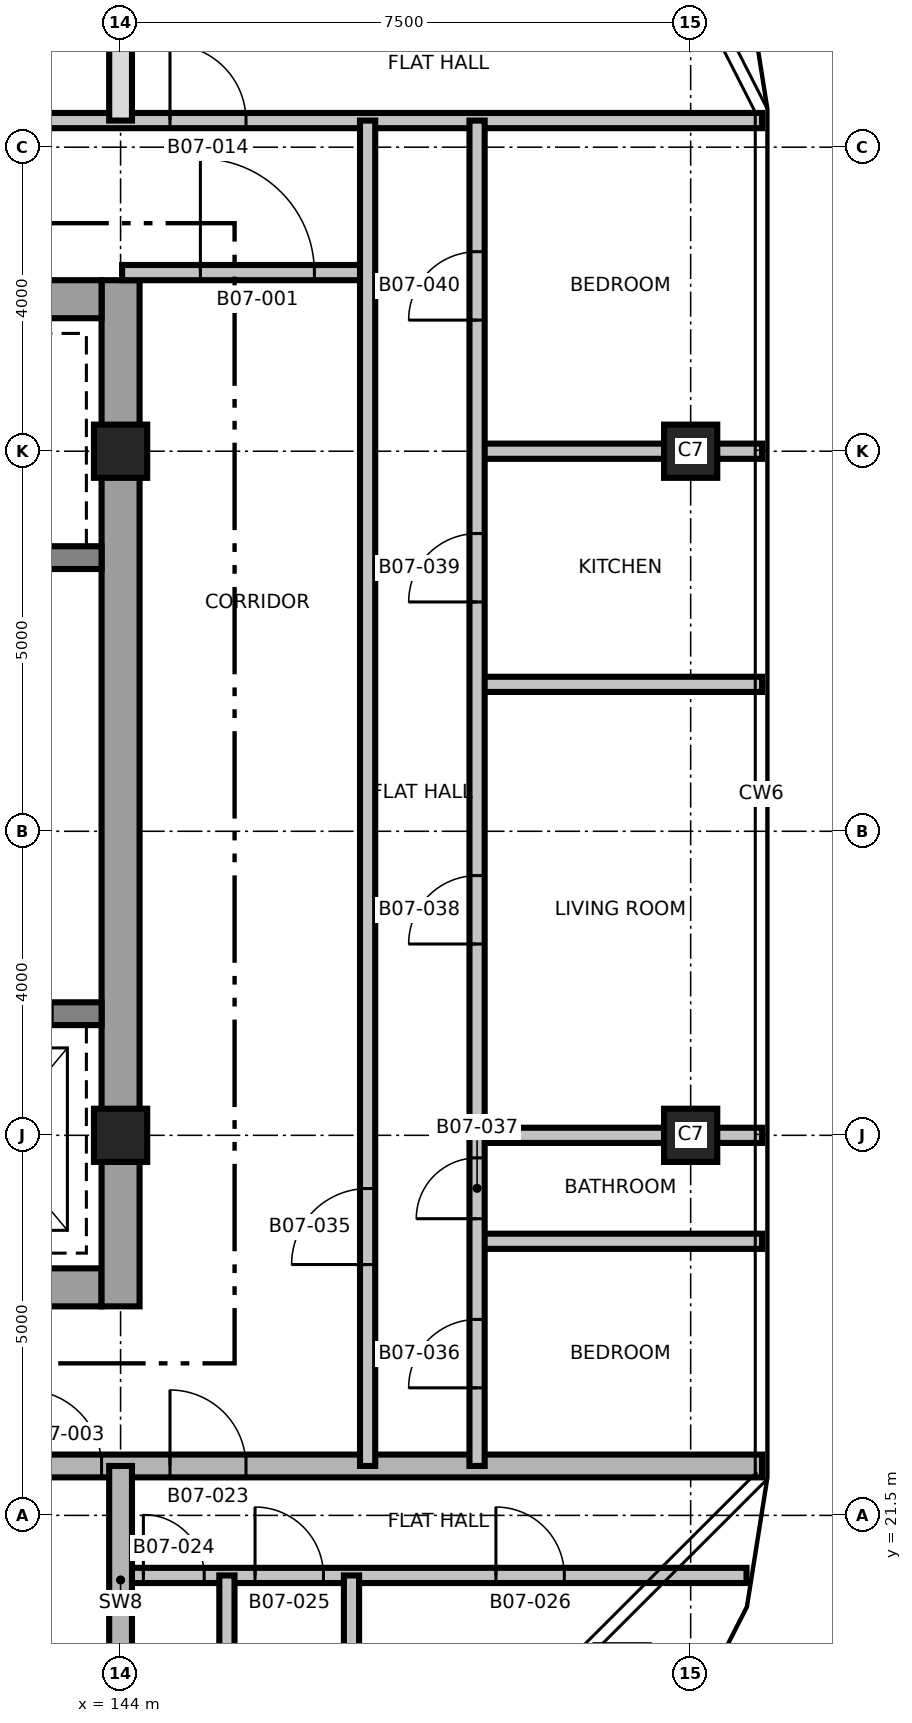
"""IFC4 building model, lengths in metres.
Left out: names, types, materials, properties, quantities, classifications, styles, units other than length and angle.
Written with IfcOpenShell. Run it as: python <this file> out.ifc"""

import sys

from ifc_helpers import new_model, si_unit, direction, frame, frame_2d, origin, origin_2d, place, context, subcontext, project, spatial, rectangle, extrude, element, fill, save


model = new_model("IFC4")
c1 = context("Model", 3, precision=1e-05, world=origin(), true_north=direction((0.0, 1.0)))
c2 = subcontext(c1, "Body", "Model", "MODEL_VIEW")
j1 = project(units=[si_unit("LENGTHUNIT", "METRE"), si_unit("PLANEANGLEUNIT", "RADIAN")], contexts=[c1])
p1 = place(None, origin())
s1 = spatial("IfcSite", under=j1, at=p1, CompositionType="ELEMENT")
p2 = place(p1, origin())
s2 = spatial("IfcBuilding", under=s1, at=p2, CompositionType="ELEMENT")
p3 = place(p2, frame((0.0, 0.0, 87.1)))
s3 = spatial("IfcBuildingStorey", under=s2, at=p3, CompositionType="ELEMENT", Elevation=87.1)
p4 = place(p3, frame((128.75, 24.5, 0.0), z_axis=(0.0, 0.0, 1.0), x_axis=(1.0, 0.0, 0.0)))
e1 = element("IfcWall", 1, at=p4, inside=s3, PredefinedType="SHEAR", context=c2, shape_type="SweptSolid", body=[
    extrude(rectangle(XDim=15.0, YDim=0.5, at=frame_2d((7.5, 0.0))), origin(), (0.0, 0.0, 1.0), 3.7),
])
p5 = place(p4, frame((9.65, 0.0, 0.0)))
e2 = element("IfcOpeningElement", 2, at=p5, cuts=e1, PredefinedType="OPENING", context=c2, shape_type="SweptSolid", body=[
    extrude(rectangle(XDim=1.5, YDim=2.1, at=frame_2d((0.75, 1.05))), frame((0.0, 0.26, 0.0), z_axis=(0.0, -1.0, 0.0), x_axis=(1.0, 0.0, 0.0)), (0.0, 0.0, 1.0), 0.52),
])
p6 = place(p4, frame((1.25, 0.0, 0.0)))
e3 = element("IfcOpeningElement", 3, at=p6, cuts=e1, PredefinedType="OPENING", context=c2, shape_type="SweptSolid", body=[
    extrude(rectangle(XDim=0.9, YDim=2.1, at=frame_2d((0.45, 1.05))), frame((0.0, 0.26, 0.0), z_axis=(0.0, -1.0, 0.0), x_axis=(1.0, 0.0, 0.0)), (0.0, 0.0, 1.0), 0.52),
])
p7 = place(p3, frame((144.0, 24.25, 0.0), z_axis=(0.0, 0.0, 1.0), x_axis=(0.0, 1.0, 0.0)))
e4 = element("IfcWall", 4, at=p7, inside=s3, PredefinedType="SHEAR", context=c2, shape_type="SweptSolid", body=[
    extrude(rectangle(XDim=13.5, YDim=0.5, at=frame_2d((6.75, 0.0))), origin(), (0.0, 0.0, 1.0), 3.7),
])
p8 = place(p3, frame((128.75, 37.5, 0.0), z_axis=(0.0, 0.0, 1.0), x_axis=(1.0, 0.0, 0.0)))
e5 = element("IfcWall", 5, at=p8, inside=s3, PredefinedType="SHEAR", context=c2, shape_type="SweptSolid", body=[
    extrude(rectangle(XDim=15.0, YDim=0.5, at=frame_2d((7.5, 0.0))), origin(), (0.0, 0.0, 1.0), 3.7),
])
p9 = place(p8, frame((9.65, 0.0, 0.0)))
e6 = element("IfcOpeningElement", 6, at=p9, cuts=e5, PredefinedType="OPENING", context=c2, shape_type="SweptSolid", body=[
    extrude(rectangle(XDim=1.5, YDim=2.1, at=frame_2d((0.75, 1.05))), frame((0.0, 0.26, 0.0), z_axis=(0.0, -1.0, 0.0), x_axis=(1.0, 0.0, 0.0)), (0.0, 0.0, 1.0), 0.52),
])
p10 = place(p8, frame((12.85, 0.0, 0.0)))
e7 = element("IfcOpeningElement", 7, at=p10, cuts=e5, PredefinedType="OPENING", context=c2, shape_type="SweptSolid", body=[
    extrude(rectangle(XDim=0.9, YDim=2.1, at=frame_2d((0.45, 1.05))), frame((0.0, 0.26, 0.0), z_axis=(0.0, -1.0, 0.0), x_axis=(1.0, 0.0, 0.0)), (0.0, 0.0, 1.0), 0.52),
])
p11 = place(p8, frame((3.8, 0.0, 0.0)))
e8 = element("IfcOpeningElement", 8, at=p11, cuts=e5, PredefinedType="OPENING", context=c2, shape_type="SweptSolid", body=[
    extrude(rectangle(XDim=0.9, YDim=2.1, at=frame_2d((0.45, 1.05))), frame((0.0, 0.26, 0.0), z_axis=(0.0, -1.0, 0.0), x_axis=(1.0, 0.0, 0.0)), (0.0, 0.0, 1.0), 0.52),
])
p12 = place(p8, frame((6.7, 0.0, 0.0)))
e9 = element("IfcOpeningElement", 9, at=p12, cuts=e5, PredefinedType="OPENING", context=c2, shape_type="SweptSolid", body=[
    extrude(rectangle(XDim=0.9, YDim=2.1, at=frame_2d((0.45, 1.05))), frame((0.0, 0.26, 0.0), z_axis=(0.0, -1.0, 0.0), x_axis=(1.0, 0.0, 0.0)), (0.0, 0.0, 1.0), 0.52),
])
p13 = place(p3, frame((141.05, 28.1, 0.0), z_axis=(0.0, 0.0, 1.0), x_axis=(1.0, 0.0, 0.0)))
e10 = element("IfcWall", 10, at=p13, inside=s3, PredefinedType="SHEAR", context=c2, shape_type="SweptSolid", body=[
    extrude(rectangle(XDim=2.7, YDim=0.3, at=frame_2d((1.35, 0.0))), origin(), (0.0, 0.0, 1.0), 3.7),
])
p14 = place(p13, frame((0.75, 0.0, 0.0)))
e11 = element("IfcOpeningElement", 11, at=p14, cuts=e10, PredefinedType="OPENING", context=c2, shape_type="SweptSolid", body=[
    extrude(rectangle(XDim=1.3, YDim=2.4, at=frame_2d((0.65, 1.2))), frame((0.0, 0.16, 0.0), z_axis=(0.0, -1.0, 0.0), x_axis=(1.0, 0.0, 0.0)), (0.0, 0.0, 1.0), 0.32),
])
p15 = place(p3, frame((141.05, 34.1, 0.0), z_axis=(0.0, 0.0, 1.0), x_axis=(1.0, 0.0, 0.0)))
e12 = element("IfcWall", 12, at=p15, inside=s3, PredefinedType="SHEAR", context=c2, shape_type="SweptSolid", body=[
    extrude(rectangle(XDim=2.7, YDim=0.3, at=frame_2d((1.35, 0.0))), origin(), (0.0, 0.0, 1.0), 3.7),
])
for number, where, z_axis, x_axis in (
    (13, (144.0, 26.5, 0.0), (0.0, 0.0, 1.0), (1.0, 0.0, 0.0)),
    (14, (151.5, 26.5, 0.0), (0.0, 0.0, 1.0), (1.0, 0.0, 0.0)),
    (15, (144.0, 35.5, 0.0), (0.0, 0.0, 1.0), (1.0, 0.0, 0.0)),
    (16, (151.5, 35.5, 0.0), (0.0, 0.0, 1.0), (1.0, 0.0, 0.0)),
):
    element("IfcColumn", number, at=place(p3, frame(where, z_axis=z_axis, x_axis=x_axis)), inside=s3, PredefinedType="COLUMN", context=c2, shape_type="SweptSolid", body=[
        extrude(rectangle(XDim=0.7, YDim=0.7, at=origin_2d()), origin(), (0.0, 0.0, 1.0), 3.7),
    ])
p16 = place(p3, frame((144.0, 20.71, 0.0), z_axis=(0.0, 0.0, 1.0), x_axis=(1.0, 0.0, 0.0)))
e17 = element("IfcWall", 17, at=p16, inside=s3, PredefinedType="PARTITIONING", context=c2, shape_type="SweptSolid", body=[
    extrude(rectangle(XDim=8.235, YDim=0.2, at=frame_2d((4.118, 0.0))), origin(), (0.0, 0.0, 1.0), 3.4),
])
p17 = place(p16, frame((0.3, 0.0, 0.0)))
e18 = element("IfcOpeningElement", 18, at=p17, cuts=e17, PredefinedType="OPENING", context=c2, shape_type="SweptSolid", body=[
    extrude(rectangle(XDim=0.8, YDim=2.1, at=frame_2d((0.4, 1.05))), frame((0.0, 0.11, 0.0), z_axis=(0.0, -1.0, 0.0), x_axis=(1.0, 0.0, 0.0)), (0.0, 0.0, 1.0), 0.22),
])
p18 = place(p16, frame((1.769, 0.0, 0.0)))
e19 = element("IfcOpeningElement", 19, at=p18, cuts=e17, PredefinedType="OPENING", context=c2, shape_type="SweptSolid", body=[
    extrude(rectangle(XDim=0.9, YDim=2.1, at=frame_2d((0.45, 1.05))), frame((0.0, 0.11, 0.0), z_axis=(0.0, -1.0, 0.0), x_axis=(1.0, 0.0, 0.0)), (0.0, 0.0, 1.0), 0.22),
])
p19 = place(p16, frame((4.938, 0.0, 0.0)))
e20 = element("IfcOpeningElement", 20, at=p19, cuts=e17, PredefinedType="OPENING", context=c2, shape_type="SweptSolid", body=[
    extrude(rectangle(XDim=0.9, YDim=2.1, at=frame_2d((0.45, 1.05))), frame((0.0, 0.11, 0.0), z_axis=(0.0, -1.0, 0.0), x_axis=(1.0, 0.0, 0.0)), (0.0, 0.0, 1.0), 0.22),
])
p20 = place(p3, frame((120.56, 22.15, 0.0), z_axis=(0.0, 0.0, 1.0), x_axis=(1.0, 0.0, 0.0)))
e21 = element("IfcWall", 21, at=p20, inside=s3, PredefinedType="SHEAR", context=c2, shape_type="SweptSolid", body=[
    extrude(rectangle(XDim=31.88, YDim=0.3, at=frame_2d((15.94, 0.0))), origin(), (0.0, 0.0, 1.0), 3.4),
])
p21 = place(p20, frame((22.19, 0.0, 0.0)))
e22 = element("IfcOpeningElement", 22, at=p21, cuts=e21, PredefinedType="OPENING", context=c2, shape_type="SweptSolid", body=[
    extrude(rectangle(XDim=1.0, YDim=2.1, at=frame_2d((0.5, 1.05))), frame((0.0, 0.16, 0.0), z_axis=(0.0, -1.0, 0.0), x_axis=(1.0, 0.0, 0.0)), (0.0, 0.0, 1.0), 0.32),
])
p22 = place(p20, frame((10.54, 0.0, 0.0)))
e23 = element("IfcOpeningElement", 23, at=p22, cuts=e21, PredefinedType="OPENING", context=c2, shape_type="SweptSolid", body=[
    extrude(rectangle(XDim=1.0, YDim=2.1, at=frame_2d((0.5, 1.05))), frame((0.0, 0.16, 0.0), z_axis=(0.0, -1.0, 0.0), x_axis=(1.0, 0.0, 0.0)), (0.0, 0.0, 1.0), 0.32),
])
p23 = place(p20, frame((24.09, 0.0, 0.0)))
e24 = element("IfcOpeningElement", 24, at=p23, cuts=e21, PredefinedType="OPENING", context=c2, shape_type="SweptSolid", body=[
    extrude(rectangle(XDim=1.0, YDim=2.1, at=frame_2d((0.5, 1.05))), frame((0.0, 0.16, 0.0), z_axis=(0.0, -1.0, 0.0), x_axis=(1.0, 0.0, 0.0)), (0.0, 0.0, 1.0), 0.32),
])
p24 = place(p20, frame((16.19, 0.0, 0.0)))
e25 = element("IfcOpeningElement", 25, at=p24, cuts=e21, PredefinedType="OPENING", context=c2, shape_type="SweptSolid", body=[
    extrude(rectangle(XDim=0.9, YDim=2.1, at=frame_2d((0.45, 1.05))), frame((0.0, 0.16, 0.0), z_axis=(0.0, -1.0, 0.0), x_axis=(1.0, 0.0, 0.0)), (0.0, 0.0, 1.0), 0.32),
])
for number, where, z_axis, x_axis in (
    (26, (148.69, 25.106, 0.0), (0.0, 0.0, 1.0), (1.0, 0.0, 0.0)),
    (27, (148.69, 26.5, 0.0), (0.0, 0.0, 1.0), (1.0, 0.0, 0.0)),
    (28, (148.69, 32.433, 0.0), (0.0, 0.0, 1.0), (1.0, 0.0, 0.0)),
    (29, (148.69, 35.5, 0.0), (0.0, 0.0, 1.0), (1.0, 0.0, 0.0)),
):
    element("IfcWall", number, at=place(p3, frame(where, z_axis=z_axis, x_axis=x_axis)), inside=s3, PredefinedType="PARTITIONING", context=c2, shape_type="SweptSolid", body=[
        extrude(rectangle(XDim=3.75, YDim=0.2, at=frame_2d((1.875, 0.0))), origin(), (0.0, 0.0, 1.0), 3.4),
    ])
p25 = place(p3, frame((144.02, 37.85, 0.0), z_axis=(0.0, 0.0, 1.0), x_axis=(1.0, 0.0, 0.0)))
e30 = element("IfcWall", 30, at=p25, inside=s3, PredefinedType="PARTITIONING", context=c2, shape_type="SweptSolid", body=[
    extrude(rectangle(XDim=3.23, YDim=0.2, at=frame_2d((1.615, 0.0))), origin(), (0.0, 0.0, 1.0), 3.4),
])
p26 = place(p25, frame((1.03, 0.0, 0.0)))
e31 = element("IfcOpeningElement", 31, at=p26, cuts=e30, PredefinedType="OPENING", context=c2, shape_type="SweptSolid", body=[
    extrude(rectangle(XDim=1.5, YDim=2.1, at=frame_2d((0.75, 1.05))), frame((0.0, 0.11, 0.0), z_axis=(0.0, -1.0, 0.0), x_axis=(1.0, 0.0, 0.0)), (0.0, 0.0, 1.0), 0.22),
])
p27 = place(p3, frame((120.56, 39.85, 0.0), z_axis=(0.0, 0.0, 1.0), x_axis=(1.0, 0.0, 0.0)))
e32 = element("IfcWall", 32, at=p27, inside=s3, PredefinedType="PARTITIONING", context=c2, shape_type="SweptSolid", body=[
    extrude(rectangle(XDim=31.88, YDim=0.2, at=frame_2d((15.94, 0.0))), origin(), (0.0, 0.0, 1.0), 3.4),
])
p28 = place(p27, frame((6.79, 0.0, 0.0)))
e33 = element("IfcOpeningElement", 33, at=p28, cuts=e32, PredefinedType="OPENING", context=c2, shape_type="SweptSolid", body=[
    extrude(rectangle(XDim=1.0, YDim=2.1, at=frame_2d((0.5, 1.05))), frame((0.0, 0.11, 0.0), z_axis=(0.0, -1.0, 0.0), x_axis=(1.0, 0.0, 0.0)), (0.0, 0.0, 1.0), 0.22),
])
p29 = place(p27, frame((15.44, 0.0, 0.0)))
e34 = element("IfcOpeningElement", 34, at=p29, cuts=e32, PredefinedType="OPENING", context=c2, shape_type="SweptSolid", body=[
    extrude(rectangle(XDim=1.0, YDim=2.1, at=frame_2d((0.5, 1.05))), frame((0.0, 0.11, 0.0), z_axis=(0.0, -1.0, 0.0), x_axis=(1.0, 0.0, 0.0)), (0.0, 0.0, 1.0), 0.22),
])
p30 = place(p27, frame((24.09, 0.0, 0.0)))
e35 = element("IfcOpeningElement", 35, at=p30, cuts=e32, PredefinedType="OPENING", context=c2, shape_type="SweptSolid", body=[
    extrude(rectangle(XDim=1.0, YDim=2.1, at=frame_2d((0.5, 1.05))), frame((0.0, 0.11, 0.0), z_axis=(0.0, -1.0, 0.0), x_axis=(1.0, 0.0, 0.0)), (0.0, 0.0, 1.0), 0.22),
])
p31 = place(p3, frame((144.0, 19.15, 0.0), z_axis=(0.0, 0.0, 1.0), x_axis=(0.0, 1.0, 0.0)))
e36 = element("IfcWall", 36, at=p31, inside=s3, PredefinedType="SHEAR", context=c2, shape_type="SweptSolid", body=[
    extrude(rectangle(XDim=3.0, YDim=0.3, at=frame_2d((1.5, 0.0))), origin(), (0.0, 0.0, 1.0), 3.4),
])
p32 = place(p3, frame((144.0, 39.85, 0.0), z_axis=(0.0, 0.0, 1.0), x_axis=(0.0, 1.0, 0.0)))
e37 = element("IfcWall", 37, at=p32, inside=s3, PredefinedType="PARTITIONING", context=c2, shape_type="SweptSolid", body=[
    extrude(rectangle(XDim=2.987, YDim=0.3, at=frame_2d((1.493, 0.0))), origin(), (0.0, 0.0, 1.0), 3.4),
])
p33 = place(p3, frame((145.399, 16.56, 0.0), z_axis=(0.0, 0.0, 1.0), x_axis=(0.0, 1.0, 0.0)))
e38 = element("IfcWall", 38, at=p33, inside=s3, PredefinedType="PARTITIONING", context=c2, shape_type="SweptSolid", body=[
    extrude(rectangle(XDim=4.15, YDim=0.2, at=frame_2d((2.075, 0.0))), origin(), (0.0, 0.0, 1.0), 3.4),
])
p34 = place(p3, frame((147.038, 16.567, 0.0), z_axis=(0.0, 0.0, 1.0), x_axis=(0.0, 1.0, 0.0)))
e39 = element("IfcWall", 39, at=p34, inside=s3, PredefinedType="PARTITIONING", context=c2, shape_type="SweptSolid", body=[
    extrude(rectangle(XDim=4.143, YDim=0.2, at=frame_2d((2.072, 0.0))), origin(), (0.0, 0.0, 1.0), 3.4),
])
p35 = place(p3, frame((147.25, 22.15, 0.0), z_axis=(0.0, 0.0, 1.0), x_axis=(0.0, 1.0, 0.0)))
e40 = element("IfcWall", 40, at=p35, inside=s3, PredefinedType="PARTITIONING", context=c2, shape_type="SweptSolid", body=[
    extrude(rectangle(XDim=17.7, YDim=0.2, at=frame_2d((8.85, 0.0))), origin(), (0.0, 0.0, 1.0), 3.4),
])
p36 = place(p35, frame((2.65, 0.0, 0.0)))
e41 = element("IfcOpeningElement", 41, at=p36, cuts=e40, PredefinedType="OPENING", context=c2, shape_type="SweptSolid", body=[
    extrude(rectangle(XDim=1.0, YDim=2.1, at=frame_2d((0.5, 1.05))), frame((0.0, 0.11, 0.0), z_axis=(0.0, -1.0, 0.0), x_axis=(1.0, 0.0, 0.0)), (0.0, 0.0, 1.0), 0.22),
])
p37 = place(p3, frame((148.69, 22.15, 0.0), z_axis=(0.0, 0.0, 1.0), x_axis=(0.0, 1.0, 0.0)))
e42 = element("IfcWall", 42, at=p37, inside=s3, PredefinedType="PARTITIONING", context=c2, shape_type="SweptSolid", body=[
    extrude(rectangle(XDim=17.7, YDim=0.2, at=frame_2d((8.85, 0.0))), origin(), (0.0, 0.0, 1.0), 3.4),
])
p38 = place(p37, frame((1.028, 0.0, 0.0)))
e43 = element("IfcOpeningElement", 43, at=p38, cuts=e42, PredefinedType="OPENING", context=c2, shape_type="SweptSolid", body=[
    extrude(rectangle(XDim=0.9, YDim=2.1, at=frame_2d((0.45, 1.05))), frame((0.0, 0.11, 0.0), z_axis=(0.0, -1.0, 0.0), x_axis=(1.0, 0.0, 0.0)), (0.0, 0.0, 1.0), 0.22),
])
p39 = place(p37, frame((3.253, 0.0, 0.0)))
e44 = element("IfcOpeningElement", 44, at=p39, cuts=e42, PredefinedType="OPENING", context=c2, shape_type="SweptSolid", body=[
    extrude(rectangle(XDim=0.8, YDim=2.1, at=frame_2d((0.4, 1.05))), frame((0.0, 0.11, 0.0), z_axis=(0.0, -1.0, 0.0), x_axis=(1.0, 0.0, 0.0)), (0.0, 0.0, 1.0), 0.22),
])
p40 = place(p37, frame((6.867, 0.0, 0.0)))
e45 = element("IfcOpeningElement", 45, at=p40, cuts=e42, PredefinedType="OPENING", context=c2, shape_type="SweptSolid", body=[
    extrude(rectangle(XDim=0.9, YDim=2.1, at=frame_2d((0.45, 1.05))), frame((0.0, 0.11, 0.0), z_axis=(0.0, -1.0, 0.0), x_axis=(1.0, 0.0, 0.0)), (0.0, 0.0, 1.0), 0.22),
])
p41 = place(p37, frame((11.367, 0.0, 0.0)))
e46 = element("IfcOpeningElement", 46, at=p41, cuts=e42, PredefinedType="OPENING", context=c2, shape_type="SweptSolid", body=[
    extrude(rectangle(XDim=0.9, YDim=2.1, at=frame_2d((0.45, 1.05))), frame((0.0, 0.11, 0.0), z_axis=(0.0, -1.0, 0.0), x_axis=(1.0, 0.0, 0.0)), (0.0, 0.0, 1.0), 0.22),
])
p42 = place(p37, frame((15.075, 0.0, 0.0)))
e47 = element("IfcOpeningElement", 47, at=p42, cuts=e42, PredefinedType="OPENING", context=c2, shape_type="SweptSolid", body=[
    extrude(rectangle(XDim=0.9, YDim=2.1, at=frame_2d((0.45, 1.05))), frame((0.0, 0.11, 0.0), z_axis=(0.0, -1.0, 0.0), x_axis=(1.0, 0.0, 0.0)), (0.0, 0.0, 1.0), 0.22),
])
p43 = place(p26, origin())
e48 = element("IfcDoor", 48, at=p43, inside=s3, OperationType="SINGLE_SWING_LEFT", PredefinedType="DOOR", context=c2, shape_type="SweptSolid", body=[
    extrude(rectangle(XDim=1.5, YDim=2.1, at=frame_2d((0.75, 1.05))), frame((0.0, 0.025, 0.0), z_axis=(0.0, -1.0, 0.0), x_axis=(1.0, 0.0, 0.0)), (0.0, 0.0, 1.0), 0.05),
])
fill(e31, e48)
p44 = place(p21, origin())
e49 = element("IfcDoor", 49, at=p44, inside=s3, OperationType="SINGLE_SWING_LEFT", PredefinedType="DOOR", context=c2, shape_type="SweptSolid", body=[
    extrude(rectangle(XDim=1.0, YDim=2.1, at=frame_2d((0.5, 1.05))), frame((0.0, 0.025, 0.0), z_axis=(0.0, -1.0, 0.0), x_axis=(1.0, 0.0, 0.0)), (0.0, 0.0, 1.0), 0.05),
])
fill(e22, e49)
p45 = place(p30, origin())
e50 = element("IfcDoor", 50, at=p45, inside=s3, OperationType="SINGLE_SWING_RIGHT", PredefinedType="DOOR", context=c2, shape_type="SweptSolid", body=[
    extrude(rectangle(XDim=1.0, YDim=2.1, at=frame_2d((0.5, 1.05))), frame((0.0, 0.025, 0.0), z_axis=(0.0, -1.0, 0.0), x_axis=(1.0, 0.0, 0.0)), (0.0, 0.0, 1.0), 0.05),
])
fill(e35, e50)
p46 = place(p23, origin())
e51 = element("IfcDoor", 51, at=p46, inside=s3, OperationType="SINGLE_SWING_LEFT", PredefinedType="DOOR", context=c2, shape_type="SweptSolid", body=[
    extrude(rectangle(XDim=1.0, YDim=2.1, at=frame_2d((0.5, 1.05))), frame((0.0, 0.025, 0.0), z_axis=(0.0, -1.0, 0.0), x_axis=(1.0, 0.0, 0.0)), (0.0, 0.0, 1.0), 0.05),
])
fill(e24, e51)
p47 = place(p17, origin())
e52 = element("IfcDoor", 52, at=p47, inside=s3, OperationType="SINGLE_SWING_RIGHT", PredefinedType="DOOR", context=c2, shape_type="SweptSolid", body=[
    extrude(rectangle(XDim=0.8, YDim=2.1, at=frame_2d((0.4, 1.05))), frame((0.0, 0.025, 0.0), z_axis=(0.0, -1.0, 0.0), x_axis=(1.0, 0.0, 0.0)), (0.0, 0.0, 1.0), 0.05),
])
fill(e18, e52)
p48 = place(p18, origin())
e53 = element("IfcDoor", 53, at=p48, inside=s3, OperationType="SINGLE_SWING_LEFT", PredefinedType="DOOR", context=c2, shape_type="SweptSolid", body=[
    extrude(rectangle(XDim=0.9, YDim=2.1, at=frame_2d((0.45, 1.05))), frame((0.0, 0.025, 0.0), z_axis=(0.0, -1.0, 0.0), x_axis=(1.0, 0.0, 0.0)), (0.0, 0.0, 1.0), 0.05),
])
fill(e19, e53)
p49 = place(p19, origin())
e54 = element("IfcDoor", 54, at=p49, inside=s3, OperationType="SINGLE_SWING_RIGHT", PredefinedType="DOOR", context=c2, shape_type="SweptSolid", body=[
    extrude(rectangle(XDim=0.9, YDim=2.1, at=frame_2d((0.45, 1.05))), frame((0.0, 0.025, 0.0), z_axis=(0.0, -1.0, 0.0), x_axis=(1.0, 0.0, 0.0)), (0.0, 0.0, 1.0), 0.05),
])
fill(e20, e54)
p50 = place(p36, origin())
e55 = element("IfcDoor", 55, at=p50, inside=s3, OperationType="SINGLE_SWING_LEFT", PredefinedType="DOOR", context=c2, shape_type="SweptSolid", body=[
    extrude(rectangle(XDim=1.0, YDim=2.1, at=frame_2d((0.5, 1.05))), frame((0.0, 0.025, 0.0), z_axis=(0.0, -1.0, 0.0), x_axis=(1.0, 0.0, 0.0)), (0.0, 0.0, 1.0), 0.05),
])
fill(e41, e55)
p51 = place(p38, origin())
e56 = element("IfcDoor", 56, at=p51, inside=s3, OperationType="SINGLE_SWING_RIGHT", PredefinedType="DOOR", context=c2, shape_type="SweptSolid", body=[
    extrude(rectangle(XDim=0.9, YDim=2.1, at=frame_2d((0.45, 1.05))), frame((0.0, 0.025, 0.0), z_axis=(0.0, -1.0, 0.0), x_axis=(1.0, 0.0, 0.0)), (0.0, 0.0, 1.0), 0.05),
])
fill(e43, e56)
p52 = place(p39, origin())
e57 = element("IfcDoor", 57, at=p52, inside=s3, OperationType="SINGLE_SWING_LEFT", PredefinedType="DOOR", context=c2, shape_type="SweptSolid", body=[
    extrude(rectangle(XDim=0.8, YDim=2.1, at=frame_2d((0.4, 1.05))), frame((0.0, 0.025, 0.0), z_axis=(0.0, -1.0, 0.0), x_axis=(1.0, 0.0, 0.0)), (0.0, 0.0, 1.0), 0.05),
])
fill(e44, e57)
p53 = place(p40, origin())
e58 = element("IfcDoor", 58, at=p53, inside=s3, OperationType="SINGLE_SWING_RIGHT", PredefinedType="DOOR", context=c2, shape_type="SweptSolid", body=[
    extrude(rectangle(XDim=0.9, YDim=2.1, at=frame_2d((0.45, 1.05))), frame((0.0, 0.025, 0.0), z_axis=(0.0, -1.0, 0.0), x_axis=(1.0, 0.0, 0.0)), (0.0, 0.0, 1.0), 0.05),
])
fill(e45, e58)
p54 = place(p41, origin())
e59 = element("IfcDoor", 59, at=p54, inside=s3, OperationType="SINGLE_SWING_LEFT", PredefinedType="DOOR", context=c2, shape_type="SweptSolid", body=[
    extrude(rectangle(XDim=0.9, YDim=2.1, at=frame_2d((0.45, 1.05))), frame((0.0, 0.025, 0.0), z_axis=(0.0, -1.0, 0.0), x_axis=(1.0, 0.0, 0.0)), (0.0, 0.0, 1.0), 0.05),
])
fill(e46, e59)
p55 = place(p42, origin())
e60 = element("IfcDoor", 60, at=p55, inside=s3, OperationType="SINGLE_SWING_RIGHT", PredefinedType="DOOR", context=c2, shape_type="SweptSolid", body=[
    extrude(rectangle(XDim=0.9, YDim=2.1, at=frame_2d((0.45, 1.05))), frame((0.0, 0.025, 0.0), z_axis=(0.0, -1.0, 0.0), x_axis=(1.0, 0.0, 0.0)), (0.0, 0.0, 1.0), 0.05),
])
fill(e47, e60)
save(model, sys.argv[1])
